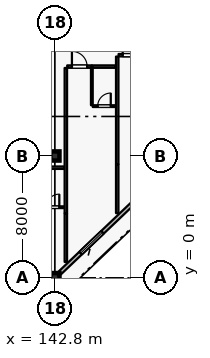
"""IFC4 building model, lengths in metres.
Left out: names, types, materials, properties, quantities, classifications, styles, units other than length and angle.
Written with IfcOpenShell. Run it as: python <this file> out.ifc"""

import sys

from ifc_helpers import new_model, si_unit, direction, frame, frame_2d, origin, origin_2d, place, context, subcontext, project, spatial, rectangle, extrude, element, fill, save


model = new_model("IFC4")
c1 = context("Model", 3, precision=1e-05, world=origin(), true_north=direction((0.0, 1.0)))
c2 = subcontext(c1, "Body", "Model", "MODEL_VIEW")
j1 = project(units=[si_unit("LENGTHUNIT", "METRE"), si_unit("PLANEANGLEUNIT", "RADIAN")], contexts=[c1])
p1 = place(None, origin())
s1 = spatial("IfcSite", under=j1, at=p1, CompositionType="ELEMENT")
p2 = place(p1, origin())
s2 = spatial("IfcBuilding", under=s1, at=p2, CompositionType="ELEMENT")
p3 = place(p2, frame((0.0, 0.0, 43.2)))
s3 = spatial("IfcBuildingStorey", under=s2, at=p3, CompositionType="ELEMENT", Elevation=43.2)
for number, where, z_axis, x_axis in (
    (1, (142.8, 0.0, 0.0), (0.0, 0.0, 1.0), (1.0, 0.0, 0.0)),
    (2, (142.8, 8.0, 0.0), (0.0, 0.0, 1.0), (1.0, 0.0, 0.0)),
):
    element("IfcColumn", number, at=place(p3, frame(where, z_axis=z_axis, x_axis=x_axis)), inside=s3, PredefinedType="COLUMN", context=c2, shape_type="SweptSolid", body=[
        extrude(rectangle(XDim=0.6, YDim=0.6, at=origin_2d()), origin(), (0.0, 0.0, 1.0), 4.2),
    ])
p4 = place(p3, frame((150.9, 7.714, 0.0), z_axis=(0.0, 0.0, 1.0), x_axis=(-0.724145477467, -0.689647248573, 0.0)))
e3 = element("IfcWall", 3, at=p4, inside=s3, PredefinedType="SOLIDWALL", context=c2, shape_type="SweptSolid", body=[
    extrude(rectangle(XDim=10.771, YDim=0.24, at=frame_2d((5.385, 0.0))), origin(), (0.0, 0.0, 1.0), 3.54),
])
p5 = place(p4, frame((2.44, 0.0, 0.0)))
e4 = element("IfcOpeningElement", 4, at=p5, cuts=e3, PredefinedType="OPENING", context=c2, shape_type="SweptSolid", body=[
    extrude(rectangle(XDim=1.5, YDim=2.25, at=frame_2d((0.75, 1.125))), frame((0.0, 0.13, 0.0), z_axis=(0.0, -1.0, 0.0), x_axis=(1.0, 0.0, 0.0)), (0.0, 0.0, 1.0), 0.26),
])
p6 = place(p4, frame((6.857, 0.0, 0.8)))
e5 = element("IfcOpeningElement", 5, at=p6, cuts=e3, PredefinedType="OPENING", context=c2, shape_type="SweptSolid", body=[
    extrude(rectangle(XDim=2.0, YDim=1.75, at=frame_2d((1.0, 0.875))), frame((0.0, 0.13, 0.0), z_axis=(0.0, -1.0, 0.0), x_axis=(1.0, 0.0, 0.0)), (0.0, 0.0, 1.0), 0.26),
])
p7 = place(p3, frame((141.85, 7.23, 0.0), z_axis=(0.0, 0.0, 1.0), x_axis=(1.0, 0.0, 0.0)))
e6 = element("IfcWall", 6, at=p7, inside=s3, PredefinedType="PARTITIONING", context=c2, shape_type="SweptSolid", body=[
    extrude(rectangle(XDim=1.58, YDim=0.16, at=frame_2d((0.79, 0.0))), origin(), (0.0, 0.0, 1.0), 3.935),
])
p8 = place(p3, frame((141.9, 4.63, 0.0), z_axis=(0.0, 0.0, 1.0), x_axis=(1.0, 0.0, 0.0)))
e7 = element("IfcWall", 7, at=p8, inside=s3, PredefinedType="PARTITIONING", context=c2, shape_type="SweptSolid", body=[
    extrude(rectangle(XDim=1.52, YDim=0.115, at=frame_2d((0.76, 0.0))), origin(), (0.0, 0.0, 1.0), 3.935),
])
p9 = place(p8, frame((0.33, 0.0, 0.0)))
e8 = element("IfcOpeningElement", 8, at=p9, cuts=e7, PredefinedType="OPENING", context=c2, shape_type="SweptSolid", body=[
    extrude(rectangle(XDim=0.86, YDim=2.12, at=frame_2d((0.43, 1.06))), frame((0.0, 0.067, 0.0), z_axis=(0.0, -1.0, 0.0), x_axis=(1.0, 0.0, 0.0)), (0.0, 0.0, 1.0), 0.135),
])
p10 = place(p3, frame((143.52, 1.03, 0.0), z_axis=(0.0, 0.0, 1.0), x_axis=(0.0, 1.0, 0.0)))
e9 = element("IfcWall", 9, at=p10, inside=s3, PredefinedType="PARTITIONING", context=c2, shape_type="SweptSolid", body=[
    extrude(rectangle(XDim=3.2, YDim=0.16, at=frame_2d((1.6, 0.0))), origin(), (0.0, 0.0, 1.0), 3.935),
])
p11 = place(p3, frame((143.61, 13.88, 0.0), z_axis=(0.0, 0.0, 1.0), x_axis=(1.0, 0.0, 0.0)))
e10 = element("IfcWall", 10, at=p11, inside=s3, PredefinedType="PARTITIONING", context=c2, shape_type="SweptSolid", body=[
    extrude(rectangle(XDim=1.62, YDim=0.16, at=frame_2d((0.81, 0.0))), origin(), (0.0, 0.0, 1.0), 3.935),
])
p12 = place(p11, frame((0.31, 0.0, 0.0)))
e11 = element("IfcOpeningElement", 11, at=p12, cuts=e10, PredefinedType="OPENING", context=c2, shape_type="SweptSolid", body=[
    extrude(rectangle(XDim=1.0, YDim=2.25, at=frame_2d((0.5, 1.125))), frame((0.0, 0.09, 0.0), z_axis=(0.0, -1.0, 0.0), x_axis=(1.0, 0.0, 0.0)), (0.0, 0.0, 1.0), 0.18),
])
p13 = place(p3, frame((145.24, 13.88, 0.0), z_axis=(0.0, 0.0, 1.0), x_axis=(1.0, 0.0, 0.0)))
e12 = element("IfcWall", 12, at=p13, inside=s3, PredefinedType="PARTITIONING", context=c2, shape_type="SweptSolid", body=[
    extrude(rectangle(XDim=1.57, YDim=0.16, at=frame_2d((0.785, 0.0))), origin(), (0.0, 0.0, 1.0), 3.935),
])
p14 = place(p3, frame((145.23, 11.34, 0.0), z_axis=(0.0, 0.0, 1.0), x_axis=(0.0, 1.0, 0.0)))
e13 = element("IfcWall", 13, at=p14, inside=s3, PredefinedType="PARTITIONING", context=c2, shape_type="SweptSolid", body=[
    extrude(rectangle(XDim=2.45, YDim=0.115, at=frame_2d((1.225, 0.0))), origin(), (0.0, 0.0, 1.0), 3.935),
])
p15 = place(p3, frame((145.29, 11.28, 0.0), z_axis=(0.0, 0.0, 1.0), x_axis=(1.0, 0.0, 0.0)))
e14 = element("IfcWall", 14, at=p15, inside=s3, PredefinedType="PARTITIONING", context=c2, shape_type="SweptSolid", body=[
    extrude(rectangle(XDim=1.51, YDim=0.115, at=frame_2d((0.755, 0.0))), origin(), (0.0, 0.0, 1.0), 3.935),
])
p16 = place(p15, frame((0.325, 0.0, 0.0)))
e15 = element("IfcOpeningElement", 15, at=p16, cuts=e14, PredefinedType="OPENING", context=c2, shape_type="SweptSolid", body=[
    extrude(rectangle(XDim=0.86, YDim=2.12, at=frame_2d((0.43, 1.06))), frame((0.0, 0.067, 0.0), z_axis=(0.0, -1.0, 0.0), x_axis=(1.0, 0.0, 0.0)), (0.0, 0.0, 1.0), 0.135),
])
p17 = place(p3, frame((143.52, 4.24, 0.0), z_axis=(0.0, 0.0, 1.0), x_axis=(0.0, 1.0, 0.0)))
e16 = element("IfcWall", 16, at=p17, inside=s3, PredefinedType="PARTITIONING", context=c2, shape_type="SweptSolid", body=[
    extrude(rectangle(XDim=9.55, YDim=0.16, at=frame_2d((4.775, 0.0))), origin(), (0.0, 0.0, 1.0), 3.935),
])
p18 = place(p3, frame((146.9, 4.24, 0.0), z_axis=(0.0, 0.0, 1.0), x_axis=(0.0, 1.0, 0.0)))
e17 = element("IfcWall", 17, at=p18, inside=s3, PredefinedType="PARTITIONING", context=c2, shape_type="SweptSolid", body=[
    extrude(rectangle(XDim=3.21, YDim=0.16, at=frame_2d((1.605, 0.0))), origin(), (0.0, 0.0, 1.0), 3.935),
])
p19 = place(p3, frame((146.99, 14.63, 0.0), z_axis=(0.0, 0.0, 1.0), x_axis=(1.0, 0.0, 0.0)))
e18 = element("IfcWall", 18, at=p19, inside=s3, PredefinedType="PARTITIONING", context=c2, shape_type="SweptSolid", body=[
    extrude(rectangle(XDim=1.62, YDim=0.16, at=frame_2d((0.81, 0.0))), origin(), (0.0, 0.0, 1.0), 3.935),
])
p20 = place(p19, frame((0.27, 0.0, 0.0)))
e19 = element("IfcOpeningElement", 19, at=p20, cuts=e18, PredefinedType="OPENING", context=c2, shape_type="SweptSolid", body=[
    extrude(rectangle(XDim=1.08, YDim=2.3, at=frame_2d((0.54, 1.15))), frame((0.0, 0.09, 0.0), z_axis=(0.0, -1.0, 0.0), x_axis=(1.0, 0.0, 0.0)), (0.0, 0.0, 1.0), 0.18),
])
p21 = place(p3, frame((146.9, 7.46, 0.0), z_axis=(0.0, 0.0, 1.0), x_axis=(0.0, 1.0, 0.0)))
e20 = element("IfcWall", 20, at=p21, inside=s3, PredefinedType="PARTITIONING", context=c2, shape_type="SweptSolid", body=[
    extrude(rectangle(XDim=7.08, YDim=0.16, at=frame_2d((3.54, 0.0))), origin(), (0.0, 0.0, 1.0), 3.935),
])
p22 = place(p6, origin())
e21 = element("IfcWindow", 21, at=p22, inside=s3, PartitioningType="DOUBLE_PANEL_VERTICAL", PredefinedType="WINDOW", context=c2, shape_type="SweptSolid", body=[
    extrude(rectangle(XDim=2.0, YDim=1.75, at=frame_2d((1.0, 0.875))), frame((0.0, 0.03, 0.0), z_axis=(0.0, -1.0, 0.0), x_axis=(1.0, 0.0, 0.0)), (0.0, 0.0, 1.0), 0.06),
])
fill(e5, e21)
p23 = place(p9, origin())
e22 = element("IfcDoor", 22, at=p23, inside=s3, OperationType="SINGLE_SWING_RIGHT", PredefinedType="DOOR", context=c2, shape_type="SweptSolid", body=[
    extrude(rectangle(XDim=0.86, YDim=2.12, at=frame_2d((0.43, 1.06))), frame((0.0, 0.025, 0.0), z_axis=(0.0, -1.0, 0.0), x_axis=(1.0, 0.0, 0.0)), (0.0, 0.0, 1.0), 0.05),
])
fill(e8, e22)
p24 = place(p12, origin())
e23 = element("IfcDoor", 23, at=p24, inside=s3, OperationType="SINGLE_SWING_LEFT", PredefinedType="DOOR", context=c2, shape_type="SweptSolid", body=[
    extrude(rectangle(XDim=1.0, YDim=2.25, at=frame_2d((0.5, 1.125))), frame((0.0, 0.025, 0.0), z_axis=(0.0, -1.0, 0.0), x_axis=(1.0, 0.0, 0.0)), (0.0, 0.0, 1.0), 0.05),
])
fill(e11, e23)
p25 = place(p16, origin())
e24 = element("IfcDoor", 24, at=p25, inside=s3, OperationType="SINGLE_SWING_RIGHT", PredefinedType="DOOR", context=c2, shape_type="SweptSolid", body=[
    extrude(rectangle(XDim=0.86, YDim=2.12, at=frame_2d((0.43, 1.06))), frame((0.0, 0.025, 0.0), z_axis=(0.0, -1.0, 0.0), x_axis=(1.0, 0.0, 0.0)), (0.0, 0.0, 1.0), 0.05),
])
fill(e15, e24)
p26 = place(p20, origin())
e25 = element("IfcDoor", 25, at=p26, inside=s3, OperationType="SINGLE_SWING_LEFT", PredefinedType="DOOR", context=c2, shape_type="SweptSolid", body=[
    extrude(rectangle(XDim=1.08, YDim=2.3, at=frame_2d((0.54, 1.15))), frame((0.0, 0.025, 0.0), z_axis=(0.0, -1.0, 0.0), x_axis=(1.0, 0.0, 0.0)), (0.0, 0.0, 1.0), 0.05),
])
fill(e19, e25)
save(model, sys.argv[1])
